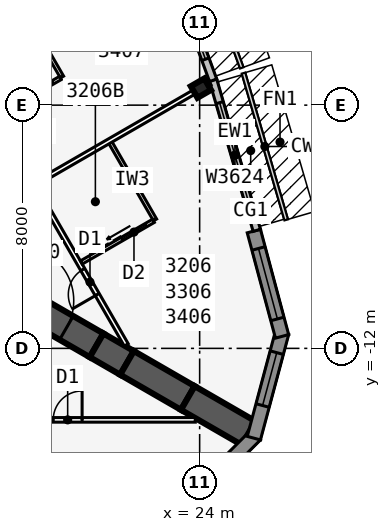
"""IFC4 building model, lengths in metres.
Left out: names, types, materials, properties, quantities, classifications, styles, units other than length and angle.
Written with IfcOpenShell. Run it as: python <this file> out.ifc"""

import sys

from ifc_helpers import new_model, si_unit, direction, frame, frame_2d, origin, origin_2d, place, context, subcontext, project, spatial, polyline, rectangle, i_section, outline, extrude, element, fill, save


model = new_model("IFC4")
c1 = context("Model", 3, precision=1e-05, world=origin(), true_north=direction((0.0, 1.0)))
c2 = subcontext(c1, "Body", "Model", "MODEL_VIEW")
j1 = project(units=[si_unit("LENGTHUNIT", "METRE"), si_unit("PLANEANGLEUNIT", "RADIAN")], contexts=[c1])
p1 = place(None, origin())
s1 = spatial("IfcSite", under=j1, at=p1, CompositionType="ELEMENT")
p2 = place(p1, origin())
s2 = spatial("IfcBuilding", under=s1, at=p2, CompositionType="ELEMENT")
p3 = place(p2, frame((0.0, 0.0, 124.9)))
s3 = spatial("IfcBuildingStorey", under=s2, at=p3, CompositionType="ELEMENT", Elevation=124.9)
p4 = place(p3, frame((16.5, -9.526, 0.0), z_axis=(0.0, 0.0, 1.0), x_axis=(0.866031398331, -0.499989616998, 0.0)))
e1 = element("IfcWall", 1, at=p4, inside=s3, PredefinedType="SHEAR", context=c2, shape_type="SweptSolid", body=[
    extrude(rectangle(XDim=4.746, YDim=0.9, at=frame_2d((2.373, 0.0))), origin(), (0.0, 0.0, 1.0), 3.4),
])
p5 = place(p4, frame((1.8, 0.0, 0.0)))
e2 = element("IfcOpeningElement", 2, at=p5, cuts=e1, PredefinedType="OPENING", context=c2, shape_type="SweptSolid", body=[
    extrude(rectangle(XDim=1.8, YDim=2.13, at=frame_2d((0.9, 1.065))), frame((0.0, 0.46, 0.0), z_axis=(0.0, -1.0, 0.0), x_axis=(1.0, 0.0, 0.0)), (0.0, 0.0, 1.0), 0.92),
])
p6 = place(p3, frame((20.61, -11.899, 0.0), z_axis=(0.0, 0.0, 1.0), x_axis=(0.866009537788, -0.500027479704, 0.0)))
e3 = element("IfcWall", 3, at=p6, inside=s3, PredefinedType="SHEAR", context=c2, shape_type="SweptSolid", body=[
    extrude(rectangle(XDim=1.155, YDim=0.9, at=frame_2d((0.577, 0.0))), origin(), (0.0, 0.0, 1.0), 3.4),
])
for number, where, z_axis, x_axis in (
    (4, (21.61, -12.477, 0.0), (0.0, 0.0, 1.0), (0.866, -0.5, 0.0)),
    (5, (23.61, -13.631, 0.0), (0.0, 0.0, 1.0), (0.866, -0.5, 0.0)),
):
    element("IfcWall", number, at=place(p3, frame(where, z_axis=z_axis, x_axis=x_axis)), inside=s3, PredefinedType="SHEAR", context=c2, shape_type="SweptSolid", body=[
        extrude(rectangle(XDim=2.309, YDim=0.9, at=frame_2d((1.155, 0.0))), origin(), (0.0, 0.0, 1.0), 3.4),
    ])
p7 = place(p3, frame((24.041, -3.44, 0.0), z_axis=(0.0, 0.0, 1.0), x_axis=(-0.5, 0.866025403784, 0.0)))
e6 = element("IfcColumn", 6, at=p7, inside=s3, PredefinedType="COLUMN", context=c2, shape_type="SweptSolid", body=[
    extrude(i_section(OverallWidth=0.437, OverallDepth=0.513, WebThickness=0.061, FlangeThickness=0.097, at=origin_2d()), origin(), (0.0, 0.0, 1.0), 3.4),
])
p8 = place(p3, frame((23.305, -17.388, 0.0), z_axis=(0.0, 0.0, 1.0), x_axis=(0.707106781187, 0.707106781187, 0.0)))
e7 = element("IfcWall", 7, at=p8, inside=s3, PredefinedType="SOLIDWALL", context=c2, shape_type="SweptSolid", body=[
    extrude(outline(polyline([(3.586, 0.225), (3.527, 0.225), (3.035, 0.093), (3.0, 0.225), (0.0, 0.225), (0.0, -0.225), (3.586, -0.225), (3.586, 0.225)])), origin(), (0.0, 0.0, 1.0), 3.235),
])
p9 = place(p8, frame((0.675, 0.0, 0.45)))
e8 = element("IfcOpeningElement", 8, at=p9, cuts=e7, PredefinedType="OPENING", context=c2, shape_type="SweptSolid", body=[
    extrude(rectangle(XDim=1.8, YDim=2.4, at=frame_2d((0.9, 1.2))), frame((0.0, 0.235, 0.0), z_axis=(0.0, -1.0, 0.0), x_axis=(1.0, 0.0, 0.0)), (0.0, 0.0, 1.0), 0.47),
])
p10 = place(p3, frame((25.783, -14.953, 0.0), z_axis=(0.0, 0.0, 1.0), x_axis=(0.258823421857, 0.965924653531, 0.0)))
e9 = element("IfcWall", 9, at=p10, inside=s3, PredefinedType="SOLIDWALL", context=c2, shape_type="SweptSolid", body=[
    extrude(outline(polyline([(3.586, 0.225), (0.586, 0.225), (0.551, 0.093), (0.06, 0.225), (0.0, 0.225), (0.0, -0.225), (3.586, -0.225), (3.586, 0.225)])), origin(), (0.0, 0.0, 1.0), 3.235),
])
p11 = place(p10, frame((1.111, 0.0, 0.45)))
e10 = element("IfcOpeningElement", 10, at=p11, cuts=e9, PredefinedType="OPENING", context=c2, shape_type="SweptSolid", body=[
    extrude(rectangle(XDim=1.8, YDim=2.4, at=frame_2d((0.9, 1.2))), frame((0.0, 0.235, 0.0), z_axis=(0.0, -1.0, 0.0), x_axis=(1.0, 0.0, 0.0)), (0.0, 0.0, 1.0), 0.47),
])
p12 = place(p3, frame((26.711, -11.605, 0.0), z_axis=(0.0, 0.0, 1.0), x_axis=(-0.258823421857, 0.965924653531, 0.0)))
e11 = element("IfcWall", 11, at=p12, inside=s3, PredefinedType="SOLIDWALL", context=c2, shape_type="SweptSolid", body=[
    extrude(rectangle(XDim=3.586, YDim=0.45, at=frame_2d((1.793, 0.0))), origin(), (0.0, 0.0, 1.0), 3.235),
])
p13 = place(p12, frame((0.593, 0.0, 0.45)))
e12 = element("IfcOpeningElement", 12, at=p13, cuts=e11, PredefinedType="OPENING", context=c2, shape_type="SweptSolid", body=[
    extrude(rectangle(XDim=2.4, YDim=2.4, at=frame_2d((1.2, 1.2))), frame((0.0, 0.235, 0.0), z_axis=(0.0, -1.0, 0.0), x_axis=(1.0, 0.0, 0.0)), (0.0, 0.0, 1.0), 0.47),
])
p14 = place(p3, frame((25.88, -8.118, 0.0), z_axis=(0.0, 0.0, 1.0), x_axis=(-0.279528287117, 0.960137457191, 0.0)))
e13 = element("IfcWall", 13, at=p14, inside=s3, PredefinedType="STANDARD", context=c2, shape_type="SweptSolid", body=[
    extrude(rectangle(XDim=5.148, YDim=0.25, at=frame_2d((2.574, 0.0))), origin(), (0.0, 0.0, 1.0), 3.235),
])
p15 = place(p14, frame((0.774, 0.0, 0.45)))
e14 = element("IfcOpeningElement", 14, at=p15, cuts=e13, PredefinedType="OPENING", context=c2, shape_type="SweptSolid", body=[
    extrude(rectangle(XDim=3.6, YDim=2.4, at=frame_2d((1.8, 1.2))), frame((0.0, 0.135, 0.0), z_axis=(0.0, -1.0, 0.0), x_axis=(1.0, 0.0, 0.0)), (0.0, 0.0, 1.0), 0.27),
])
p16 = place(p3, frame((24.444, -3.183, 0.0), z_axis=(0.0, 0.0, 1.0), x_axis=(-0.343225593282, 0.939252996863, 0.0)))
e15 = element("IfcWall", 15, at=p16, inside=s3, PredefinedType="STANDARD", context=c2, shape_type="SweptSolid", body=[
    extrude(rectangle(XDim=5.076, YDim=0.25, at=frame_2d((2.538, 0.0))), origin(), (0.0, 0.0, 1.0), 3.235),
])
p17 = place(p16, frame((0.738, 0.0, 0.45)))
e16 = element("IfcOpeningElement", 16, at=p17, cuts=e15, PredefinedType="OPENING", context=c2, shape_type="SweptSolid", body=[
    extrude(rectangle(XDim=3.6, YDim=2.4, at=frame_2d((1.8, 1.2))), frame((0.0, 0.135, 0.0), z_axis=(0.0, -1.0, 0.0), x_axis=(1.0, 0.0, 0.0)), (0.0, 0.0, 1.0), 0.27),
])
p18 = place(p3, frame((-23.857, -14.351, 0.0), z_axis=(0.0, 0.0, 1.0), x_axis=(1.0, 0.0, 0.0)))
e17 = element("IfcWall", 17, at=p18, inside=s3, PredefinedType="PARTITIONING", context=c2, shape_type="SweptSolid", body=[
    extrude(rectangle(XDim=47.714, YDim=0.15, at=frame_2d((23.857, 0.0))), origin(), (0.0, 0.0, 1.0), 3.235),
])
p19 = place(p18, frame((4.682, 0.0, 0.0)))
e18 = element("IfcOpeningElement", 18, at=p19, cuts=e17, PredefinedType="OPENING", context=c2, shape_type="SweptSolid", body=[
    extrude(rectangle(XDim=0.95, YDim=2.13, at=frame_2d((0.475, 1.065))), frame((0.0, 0.085, 0.0), z_axis=(0.0, -1.0, 0.0), x_axis=(1.0, 0.0, 0.0)), (0.0, 0.0, 1.0), 0.17),
])
p20 = place(p18, frame((14.682, 0.0, 0.0)))
e19 = element("IfcOpeningElement", 19, at=p20, cuts=e17, PredefinedType="OPENING", context=c2, shape_type="SweptSolid", body=[
    extrude(rectangle(XDim=0.95, YDim=2.13, at=frame_2d((0.475, 1.065))), frame((0.0, 0.085, 0.0), z_axis=(0.0, -1.0, 0.0), x_axis=(1.0, 0.0, 0.0)), (0.0, 0.0, 1.0), 0.17),
])
p21 = place(p18, frame((21.482, 0.0, 0.0)))
e20 = element("IfcOpeningElement", 20, at=p21, cuts=e17, PredefinedType="OPENING", context=c2, shape_type="SweptSolid", body=[
    extrude(rectangle(XDim=0.95, YDim=2.13, at=frame_2d((0.475, 1.065))), frame((0.0, 0.085, 0.0), z_axis=(0.0, -1.0, 0.0), x_axis=(1.0, 0.0, 0.0)), (0.0, 0.0, 1.0), 0.17),
])
p22 = place(p18, frame((25.857, 0.0, 0.0)))
e21 = element("IfcOpeningElement", 21, at=p22, cuts=e17, PredefinedType="OPENING", context=c2, shape_type="SweptSolid", body=[
    extrude(rectangle(XDim=1.0, YDim=2.13, at=frame_2d((0.5, 1.065))), frame((0.0, 0.085, 0.0), z_axis=(0.0, -1.0, 0.0), x_axis=(1.0, 0.0, 0.0)), (0.0, 0.0, 1.0), 0.17),
])
p23 = place(p18, frame((30.282, 0.0, 0.0)))
e22 = element("IfcOpeningElement", 22, at=p23, cuts=e17, PredefinedType="OPENING", context=c2, shape_type="SweptSolid", body=[
    extrude(rectangle(XDim=0.95, YDim=2.13, at=frame_2d((0.475, 1.065))), frame((0.0, 0.085, 0.0), z_axis=(0.0, -1.0, 0.0), x_axis=(1.0, 0.0, 0.0)), (0.0, 0.0, 1.0), 0.17),
])
p24 = place(p18, frame((43.041, 0.0, 0.0)))
e23 = element("IfcOpeningElement", 23, at=p24, cuts=e17, PredefinedType="OPENING", context=c2, shape_type="SweptSolid", body=[
    extrude(rectangle(XDim=0.95, YDim=2.13, at=frame_2d((0.475, 1.065))), frame((0.0, 0.085, 0.0), z_axis=(0.0, -1.0, 0.0), x_axis=(1.0, 0.0, 0.0)), (0.0, 0.0, 1.0), 0.17),
])
p25 = place(p3, frame((21.586, -11.885, 0.0), z_axis=(0.0, 0.0, 1.0), x_axis=(-0.500001915564, 0.86602429783, 0.0)))
e24 = element("IfcWall", 24, at=p25, inside=s3, PredefinedType="PARTITIONING", context=c2, shape_type="SweptSolid", body=[
    extrude(rectangle(XDim=42.172, YDim=0.15, at=frame_2d((21.086, 0.0))), origin(), (0.0, 0.0, 1.0), 3.235),
])
p26 = place(p25, frame((1.911, 0.0, 0.0)))
e25 = element("IfcOpeningElement", 25, at=p26, cuts=e24, PredefinedType="OPENING", context=c2, shape_type="SweptSolid", body=[
    extrude(rectangle(XDim=0.95, YDim=2.13, at=frame_2d((0.475, 1.065))), frame((0.0, 0.085, 0.0), z_axis=(0.0, -1.0, 0.0), x_axis=(1.0, 0.0, 0.0)), (0.0, 0.0, 1.0), 0.17),
])
p27 = place(p25, frame((7.511, 0.0, 0.0)))
e26 = element("IfcOpeningElement", 26, at=p27, cuts=e24, PredefinedType="OPENING", context=c2, shape_type="SweptSolid", body=[
    extrude(rectangle(XDim=0.95, YDim=2.13, at=frame_2d((0.475, 1.065))), frame((0.0, 0.085, 0.0), z_axis=(0.0, -1.0, 0.0), x_axis=(1.0, 0.0, 0.0)), (0.0, 0.0, 1.0), 0.17),
])
p28 = place(p25, frame((14.311, 0.0, 0.0)))
e27 = element("IfcOpeningElement", 27, at=p28, cuts=e24, PredefinedType="OPENING", context=c2, shape_type="SweptSolid", body=[
    extrude(rectangle(XDim=0.95, YDim=2.13, at=frame_2d((0.475, 1.065))), frame((0.0, 0.085, 0.0), z_axis=(0.0, -1.0, 0.0), x_axis=(1.0, 0.0, 0.0)), (0.0, 0.0, 1.0), 0.17),
])
p29 = place(p25, frame((22.511, 0.0, 0.0)))
e28 = element("IfcOpeningElement", 28, at=p29, cuts=e24, PredefinedType="OPENING", context=c2, shape_type="SweptSolid", body=[
    extrude(rectangle(XDim=0.95, YDim=2.13, at=frame_2d((0.475, 1.065))), frame((0.0, 0.085, 0.0), z_axis=(0.0, -1.0, 0.0), x_axis=(1.0, 0.0, 0.0)), (0.0, 0.0, 1.0), 0.17),
])
p30 = place(p25, frame((29.311, 0.0, 0.0)))
e29 = element("IfcOpeningElement", 29, at=p30, cuts=e24, PredefinedType="OPENING", context=c2, shape_type="SweptSolid", body=[
    extrude(rectangle(XDim=0.95, YDim=2.13, at=frame_2d((0.475, 1.065))), frame((0.0, 0.085, 0.0), z_axis=(0.0, -1.0, 0.0), x_axis=(1.0, 0.0, 0.0)), (0.0, 0.0, 1.0), 0.17),
])
p31 = place(p25, frame((39.311, 0.0, 0.0)))
e30 = element("IfcOpeningElement", 30, at=p31, cuts=e24, PredefinedType="OPENING", context=c2, shape_type="SweptSolid", body=[
    extrude(rectangle(XDim=0.95, YDim=2.13, at=frame_2d((0.475, 1.065))), frame((0.0, 0.085, 0.0), z_axis=(0.0, -1.0, 0.0), x_axis=(1.0, 0.0, 0.0)), (0.0, 0.0, 1.0), 0.17),
])
p32 = place(p3, frame((18.608, -6.577, 0.0), z_axis=(0.0, 0.0, 1.0), x_axis=(0.866031967744, 0.499988630717, 0.0)))
e31 = element("IfcWall", 31, at=p32, inside=s3, PredefinedType="PARTITIONING", context=c2, shape_type="SweptSolid", body=[
    extrude(rectangle(XDim=6.616, YDim=0.15, at=frame_2d((3.308, 0.0))), origin(), (0.0, 0.0, 1.0), 2.389),
])
p33 = place(p3, frame((16.108, -2.247, 0.0), z_axis=(0.0, 0.0, 1.0), x_axis=(0.866025567496, 0.499999716443, 0.0)))
e32 = element("IfcWall", 32, at=p33, inside=s3, PredefinedType="PARTITIONING", context=c2, shape_type="SweptSolid", body=[
    extrude(rectangle(XDim=7.495, YDim=0.15, at=frame_2d((3.748, 0.0))), origin(), (0.0, 0.0, 1.0), 2.389),
])
p34 = place(p3, frame((22.533, -7.775, 0.0), z_axis=(0.0, 0.0, 1.0), x_axis=(-0.499990139034, 0.866031096941, 0.0)))
e33 = element("IfcWall", 33, at=p34, inside=s3, PredefinedType="PLUMBINGWALL", context=c2, shape_type="SweptSolid", body=[
    extrude(rectangle(XDim=3.0, YDim=0.12, at=frame_2d((1.5, 0.0))), origin(), (0.0, 0.0, 1.0), 3.235),
])
p35 = place(p3, frame((20.108, -9.175, 0.0), z_axis=(0.0, 0.0, 1.0), x_axis=(0.866035715982, 0.499982138324, 0.0)))
e34 = element("IfcWall", 34, at=p35, inside=s3, PredefinedType="PLUMBINGWALL", context=c2, shape_type="SweptSolid", body=[
    extrude(rectangle(XDim=2.74, YDim=0.12, at=frame_2d((1.37, 0.0))), origin(), (0.0, 0.0, 1.0), 3.235),
])
p36 = place(p35, frame((1.55, 0.0, 0.0)))
e35 = element("IfcOpeningElement", 35, at=p36, cuts=e34, PredefinedType="OPENING", context=c2, shape_type="SweptSolid", body=[
    extrude(rectangle(XDim=0.9, YDim=2.13, at=frame_2d((0.45, 1.065))), frame((0.0, 0.07, 0.0), z_axis=(0.0, -1.0, 0.0), x_axis=(1.0, 0.0, 0.0)), (0.0, 0.0, 1.0), 0.14),
])
p37 = place(p3, frame((19.473, -3.076, 0.0), z_axis=(0.0, 0.0, 1.0), x_axis=(-0.499957262057, 0.866050077142, 0.0)))
e36 = element("IfcWall", 36, at=p37, inside=s3, PredefinedType="PLUMBINGWALL", context=c2, shape_type="SweptSolid", body=[
    extrude(rectangle(XDim=2.4, YDim=0.12, at=frame_2d((1.2, 0.0))), origin(), (0.0, 0.0, 1.0), 3.235),
])
p38 = place(p3, frame((17.308, -4.326, 0.0), z_axis=(0.0, 0.0, 1.0), x_axis=(0.866023955769, 0.500002508028, 0.0)))
e37 = element("IfcWall", 37, at=p38, inside=s3, PredefinedType="PLUMBINGWALL", context=c2, shape_type="SweptSolid", body=[
    extrude(rectangle(XDim=2.44, YDim=0.12, at=frame_2d((1.22, 0.0))), origin(), (0.0, 0.0, 1.0), 3.235),
])
p39 = place(p38, frame((1.25, 0.0, 0.0)))
e38 = element("IfcOpeningElement", 38, at=p39, cuts=e37, PredefinedType="OPENING", context=c2, shape_type="SweptSolid", body=[
    extrude(rectangle(XDim=0.9, YDim=2.13, at=frame_2d((0.45, 1.065))), frame((0.0, 0.07, 0.0), z_axis=(0.0, -1.0, 0.0), x_axis=(1.0, 0.0, 0.0)), (0.0, 0.0, 1.0), 0.14),
])
p40 = place(p11, origin())
e39 = element("IfcWindow", 39, at=p40, inside=s3, PartitioningType="SINGLE_PANEL", PredefinedType="WINDOW", context=c2, shape_type="SweptSolid", body=[
    extrude(rectangle(XDim=1.8, YDim=2.4, at=frame_2d((0.9, 1.2))), frame((0.0, 0.03, 0.0), z_axis=(0.0, -1.0, 0.0), x_axis=(1.0, 0.0, 0.0)), (0.0, 0.0, 1.0), 0.06),
])
fill(e10, e39)
p41 = place(p13, origin())
e40 = element("IfcWindow", 40, at=p41, inside=s3, PartitioningType="SINGLE_PANEL", PredefinedType="WINDOW", context=c2, shape_type="SweptSolid", body=[
    extrude(rectangle(XDim=2.4, YDim=2.4, at=frame_2d((1.2, 1.2))), frame((0.0, 0.03, 0.0), z_axis=(0.0, -1.0, 0.0), x_axis=(1.0, 0.0, 0.0)), (0.0, 0.0, 1.0), 0.06),
])
fill(e12, e40)
p42 = place(p15, origin())
e41 = element("IfcWindow", 41, at=p42, inside=s3, PartitioningType="SINGLE_PANEL", PredefinedType="WINDOW", context=c2, shape_type="SweptSolid", body=[
    extrude(rectangle(XDim=3.6, YDim=2.4, at=frame_2d((1.8, 1.2))), frame((0.0, 0.03, 0.0), z_axis=(0.0, -1.0, 0.0), x_axis=(1.0, 0.0, 0.0)), (0.0, 0.0, 1.0), 0.06),
])
fill(e14, e41)
p43 = place(p17, origin())
e42 = element("IfcWindow", 42, at=p43, inside=s3, PartitioningType="SINGLE_PANEL", PredefinedType="WINDOW", context=c2, shape_type="SweptSolid", body=[
    extrude(rectangle(XDim=3.6, YDim=2.4, at=frame_2d((1.8, 1.2))), frame((0.0, 0.03, 0.0), z_axis=(0.0, -1.0, 0.0), x_axis=(1.0, 0.0, 0.0)), (0.0, 0.0, 1.0), 0.06),
])
fill(e16, e42)
p44 = place(p24, origin())
e43 = element("IfcDoor", 43, at=p44, inside=s3, OperationType="SINGLE_SWING_RIGHT", PredefinedType="DOOR", context=c2, shape_type="SweptSolid", body=[
    extrude(rectangle(XDim=0.95, YDim=2.13, at=frame_2d((0.475, 1.065))), frame((0.0, 0.025, 0.0), z_axis=(0.0, -1.0, 0.0), x_axis=(1.0, 0.0, 0.0)), (0.0, 0.0, 1.0), 0.05),
])
fill(e23, e43)
p45 = place(p36, origin())
e44 = element("IfcDoor", 44, at=p45, inside=s3, OperationType="SLIDING_TO_LEFT", PredefinedType="DOOR", context=c2, shape_type="SweptSolid", body=[
    extrude(rectangle(XDim=0.9, YDim=2.13, at=frame_2d((0.45, 1.065))), frame((0.0, 0.025, 0.0), z_axis=(0.0, -1.0, 0.0), x_axis=(1.0, 0.0, 0.0)), (0.0, 0.0, 1.0), 0.05),
])
fill(e35, e44)
p46 = place(p26, origin())
e45 = element("IfcDoor", 45, at=p46, inside=s3, OperationType="SINGLE_SWING_LEFT", PredefinedType="DOOR", context=c2, shape_type="SweptSolid", body=[
    extrude(rectangle(XDim=0.95, YDim=2.13, at=frame_2d((0.475, 1.065))), frame((0.0, 0.025, 0.0), z_axis=(0.0, -1.0, 0.0), x_axis=(1.0, 0.0, 0.0)), (0.0, 0.0, 1.0), 0.05),
])
fill(e25, e45)
p47 = place(p39, origin())
e46 = element("IfcDoor", 46, at=p47, inside=s3, OperationType="SLIDING_TO_LEFT", PredefinedType="DOOR", context=c2, shape_type="SweptSolid", body=[
    extrude(rectangle(XDim=0.9, YDim=2.13, at=frame_2d((0.45, 1.065))), frame((0.0, 0.025, 0.0), z_axis=(0.0, -1.0, 0.0), x_axis=(1.0, 0.0, 0.0)), (0.0, 0.0, 1.0), 0.05),
])
fill(e38, e46)
p48 = place(p5, origin())
e47 = element("IfcDoor", 47, at=p48, inside=s3, OperationType="DOUBLE_DOOR_DOUBLE_SWING", PredefinedType="DOOR", context=c2, shape_type="SweptSolid", body=[
    extrude(rectangle(XDim=1.8, YDim=2.13, at=frame_2d((0.9, 1.065))), frame((0.0, 0.025, 0.0), z_axis=(0.0, -1.0, 0.0), x_axis=(1.0, 0.0, 0.0)), (0.0, 0.0, 1.0), 0.05),
])
fill(e2, e47)
save(model, sys.argv[1])
